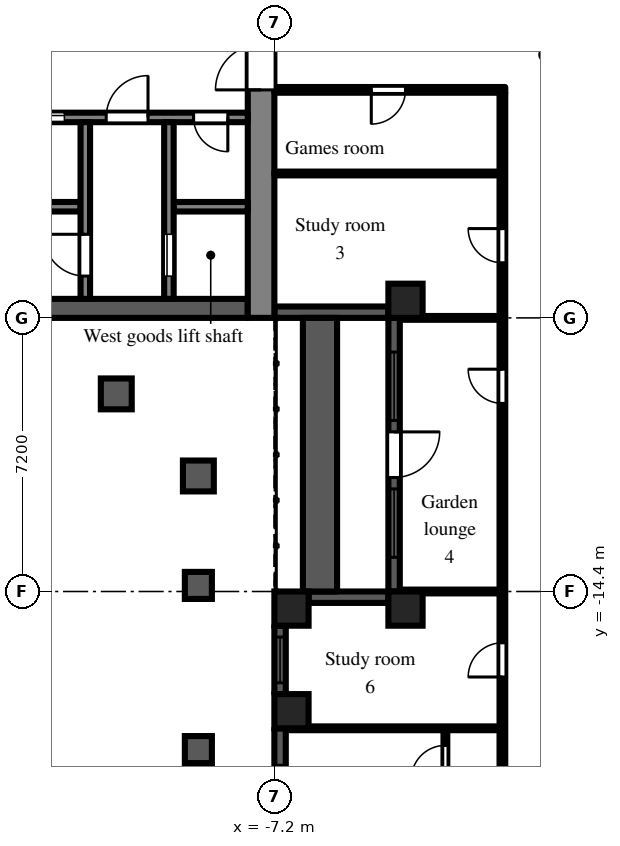
"""IFC4 building model, lengths in metres.
Left out: names, types, materials, properties, quantities, classifications, styles, units other than length and angle.
Written with IfcOpenShell. Run it as: python <this file> out.ifc"""

import sys

from ifc_helpers import new_model, si_unit, direction, frame, frame_2d, origin, origin_2d, place, context, subcontext, project, spatial, rectangle, extrude, element, fill, save


model = new_model("IFC4")
c1 = context("Model", 3, precision=1e-05, world=origin(), true_north=direction((0.0, 1.0)))
c2 = subcontext(c1, "Body", "Model", "MODEL_VIEW")
j1 = project(units=[si_unit("LENGTHUNIT", "METRE"), si_unit("PLANEANGLEUNIT", "RADIAN")], contexts=[c1])
p1 = place(None, origin())
s1 = spatial("IfcSite", under=j1, at=p1, CompositionType="ELEMENT")
p2 = place(p1, origin())
s2 = spatial("IfcBuilding", under=s1, at=p2, CompositionType="ELEMENT")
p3 = place(p2, frame((0.0, 0.0, 84.9)))
s3 = spatial("IfcBuildingStorey", under=s2, at=p3, CompositionType="ELEMENT", Elevation=84.9)
for number, where, z_axis, x_axis in (
    (1, (-6.75, -17.55, 0.0), (0.0, 0.0, 1.0), (1.0, 0.0, 0.0)),
    (2, (-6.75, -14.85, 0.0), (0.0, 0.0, 1.0), (1.0, 0.0, 0.0)),
    (3, (-3.75, -14.85, 0.0), (0.0, 0.0, 1.0), (1.0, 0.0, 0.0)),
    (4, (-3.75, -6.75, 0.0), (0.0, 0.0, 1.0), (1.0, 0.0, 0.0)),
):
    element("IfcColumn", number, at=place(p3, frame(where, z_axis=z_axis, x_axis=x_axis)), inside=s3, PredefinedType="COLUMN", context=c2, shape_type="SweptSolid", body=[
        extrude(rectangle(XDim=0.9, YDim=0.9, at=origin_2d()), origin(), (0.0, 0.0, 1.0), 3.0),
    ])
p4 = place(p3, frame((-7.2, -7.05, 0.0), z_axis=(0.0, 0.0, 1.0), x_axis=(1.0, 0.0, 0.0)))
e5 = element("IfcWall", 5, at=p4, inside=s3, PredefinedType="SOLIDWALL", context=c2, shape_type="SweptSolid", body=[
    extrude(rectangle(XDim=3.0, YDim=0.3, at=frame_2d((1.5, 0.0))), origin(), (0.0, 0.0, 1.0), 2.1),
])
p5 = place(p3, frame((-4.05, -7.2, 0.0), z_axis=(0.0, 0.0, 1.0), x_axis=(0.0, -1.0, 0.0)))
e6 = element("IfcWall", 6, at=p5, inside=s3, PredefinedType="SOLIDWALL", context=c2, shape_type="SweptSolid", body=[
    extrude(rectangle(XDim=7.2, YDim=0.3, at=frame_2d((3.6, 0.0))), origin(), (0.0, 0.0, 1.0), 2.1),
])
p6 = place(p5, frame((3.0, 0.0, 0.0)))
e7 = element("IfcOpeningElement", 7, at=p6, cuts=e6, PredefinedType="OPENING", context=c2, shape_type="SweptSolid", body=[
    extrude(rectangle(XDim=1.2, YDim=2.05, at=frame_2d((0.6, 1.025))), frame((0.0, 0.16, 0.0), z_axis=(0.0, -1.0, 0.0), x_axis=(1.0, 0.0, 0.0)), (0.0, 0.0, 1.0), 0.32),
])
p7 = place(p5, frame((0.9, 0.0, 0.2)))
e8 = element("IfcOpeningElement", 8, at=p7, cuts=e6, PredefinedType="OPENING", context=c2, shape_type="SweptSolid", body=[
    extrude(rectangle(XDim=1.8, YDim=1.85, at=frame_2d((0.9, 0.925))), frame((0.0, 0.16, 0.0), z_axis=(0.0, -1.0, 0.0), x_axis=(1.0, 0.0, 0.0)), (0.0, 0.0, 1.0), 0.32),
])
p8 = place(p5, frame((4.5, 0.0, 0.2)))
e9 = element("IfcOpeningElement", 9, at=p8, cuts=e6, PredefinedType="OPENING", context=c2, shape_type="SweptSolid", body=[
    extrude(rectangle(XDim=1.8, YDim=1.85, at=frame_2d((0.9, 0.925))), frame((0.0, 0.16, 0.0), z_axis=(0.0, -1.0, 0.0), x_axis=(1.0, 0.0, 0.0)), (0.0, 0.0, 1.0), 0.32),
])
p9 = place(p3, frame((-4.2, -14.55, 0.0), z_axis=(0.0, 0.0, 1.0), x_axis=(-1.0, 0.0, 0.0)))
e10 = element("IfcWall", 10, at=p9, inside=s3, PredefinedType="SOLIDWALL", context=c2, shape_type="SweptSolid", body=[
    extrude(rectangle(XDim=2.1, YDim=0.3, at=frame_2d((1.05, 0.0))), origin(), (0.0, 0.0, 1.0), 2.1),
])
p10 = place(p3, frame((-7.05, -15.3, 0.0), z_axis=(0.0, 0.0, 1.0), x_axis=(0.0, -1.0, 0.0)))
e11 = element("IfcWall", 11, at=p10, inside=s3, PredefinedType="SOLIDWALL", context=c2, shape_type="SweptSolid", body=[
    extrude(rectangle(XDim=1.8, YDim=0.3, at=frame_2d((0.9, 0.0))), origin(), (0.0, 0.0, 1.0), 2.1),
])
p11 = place(p10, frame((0.3, 0.0, 0.2)))
e12 = element("IfcOpeningElement", 12, at=p11, cuts=e11, PredefinedType="OPENING", context=c2, shape_type="SweptSolid", body=[
    extrude(rectangle(XDim=1.2, YDim=1.85, at=frame_2d((0.6, 0.925))), frame((0.0, 0.16, 0.0), z_axis=(0.0, -1.0, 0.0), x_axis=(1.0, 0.0, 0.0)), (0.0, 0.0, 1.0), 0.32),
])
p12 = place(p3, frame((-7.05, -18.0, 0.0), z_axis=(0.0, 0.0, 1.0), x_axis=(0.0, -1.0, 0.0)))
e13 = element("IfcWall", 13, at=p12, inside=s3, PredefinedType="SOLIDWALL", context=c2, shape_type="SweptSolid", body=[
    extrude(rectangle(XDim=3.15, YDim=0.3, at=frame_2d((1.575, 0.0))), origin(), (0.0, 0.0, 1.0), 2.1),
])
p13 = place(p12, frame((0.975, 0.0, 0.2)))
e14 = element("IfcOpeningElement", 14, at=p13, cuts=e13, PredefinedType="OPENING", context=c2, shape_type="SweptSolid", body=[
    extrude(rectangle(XDim=1.2, YDim=1.85, at=frame_2d((0.6, 0.925))), frame((0.0, 0.16, 0.0), z_axis=(0.0, -1.0, 0.0), x_axis=(1.0, 0.0, 0.0)), (0.0, 0.0, 1.0), 0.32),
])
p14 = place(p3, frame((-6.0, -14.4, 0.0), z_axis=(0.0, 0.0, 1.0), x_axis=(0.0, 1.0, 0.0)))
e15 = element("IfcWall", 15, at=p14, inside=s3, PredefinedType="PARAPET", context=c2, shape_type="SweptSolid", body=[
    extrude(rectangle(XDim=7.2, YDim=0.9, at=frame_2d((3.6, 0.0))), origin(), (0.0, 0.0, 1.0), 0.8),
])
p15 = place(p3, frame((-7.55, -7.2, 0.0), z_axis=(0.0, 0.0, 1.0), x_axis=(0.0, 1.0, 0.0)))
e16 = element("IfcWall", 16, at=p15, inside=s3, PredefinedType="SHEAR", context=c2, shape_type="SweptSolid", body=[
    extrude(rectangle(XDim=14.4, YDim=0.7, at=frame_2d((7.2, 0.0))), origin(), (0.0, 0.0, 1.0), 2.575),
])
p16 = place(p15, frame((6.0, 0.0, 0.0)))
e17 = element("IfcOpeningElement", 17, at=p16, cuts=e16, PredefinedType="OPENING", context=c2, shape_type="SweptSolid", body=[
    extrude(rectangle(XDim=2.4, YDim=2.2, at=frame_2d((1.2, 1.1))), frame((0.0, 0.36, 0.0), z_axis=(0.0, -1.0, 0.0), x_axis=(1.0, 0.0, 0.0)), (0.0, 0.0, 1.0), 0.72),
])
p17 = place(p3, frame((-7.9, -6.95, 0.0), z_axis=(0.0, 0.0, 1.0), x_axis=(-1.0, 0.0, 0.0)))
e18 = element("IfcWall", 18, at=p17, inside=s3, PredefinedType="SHEAR", context=c2, shape_type="SweptSolid", body=[
    extrude(rectangle(XDim=12.95, YDim=0.5, at=frame_2d((6.475, 0.0))), origin(), (0.0, 0.0, 1.0), 2.575),
])
p18 = place(p3, frame((-7.9, -1.925, 0.0), z_axis=(0.0, 0.0, 1.0), x_axis=(-1.0, 0.0, 0.0)))
e19 = element("IfcWall", 19, at=p18, inside=s3, PredefinedType="SHEAR", context=c2, shape_type="SweptSolid", body=[
    extrude(rectangle(XDim=12.95, YDim=0.25, at=frame_2d((6.475, 0.0))), origin(), (0.0, 0.0, 1.0), 2.575),
])
p19 = place(p18, frame((4.825, 0.0, 0.0)))
e20 = element("IfcOpeningElement", 20, at=p19, cuts=e19, PredefinedType="OPENING", context=c2, shape_type="SweptSolid", body=[
    extrude(rectangle(XDim=1.1, YDim=2.1, at=frame_2d((0.55, 1.05))), frame((0.0, 0.135, 0.0), z_axis=(0.0, -1.0, 0.0), x_axis=(1.0, 0.0, 0.0)), (0.0, 0.0, 1.0), 0.27),
])
p20 = place(p18, frame((7.025, 0.0, 0.0)))
e21 = element("IfcOpeningElement", 21, at=p20, cuts=e19, PredefinedType="OPENING", context=c2, shape_type="SweptSolid", body=[
    extrude(rectangle(XDim=1.1, YDim=2.1, at=frame_2d((0.55, 1.05))), frame((0.0, 0.135, 0.0), z_axis=(0.0, -1.0, 0.0), x_axis=(1.0, 0.0, 0.0)), (0.0, 0.0, 1.0), 0.27),
])
p21 = place(p18, frame((9.225, 0.0, 0.0)))
e22 = element("IfcOpeningElement", 22, at=p21, cuts=e19, PredefinedType="OPENING", context=c2, shape_type="SweptSolid", body=[
    extrude(rectangle(XDim=1.1, YDim=2.1, at=frame_2d((0.55, 1.05))), frame((0.0, 0.135, 0.0), z_axis=(0.0, -1.0, 0.0), x_axis=(1.0, 0.0, 0.0)), (0.0, 0.0, 1.0), 0.27),
])
p22 = place(p18, frame((0.525, 0.0, 0.0)))
e23 = element("IfcOpeningElement", 23, at=p22, cuts=e19, PredefinedType="OPENING", context=c2, shape_type="SweptSolid", body=[
    extrude(rectangle(XDim=0.9, YDim=2.1, at=frame_2d((0.45, 1.05))), frame((0.0, 0.135, 0.0), z_axis=(0.0, -1.0, 0.0), x_axis=(1.0, 0.0, 0.0)), (0.0, 0.0, 1.0), 0.27),
])
p23 = place(p18, frame((2.625, 0.0, 0.0)))
e24 = element("IfcOpeningElement", 24, at=p23, cuts=e19, PredefinedType="OPENING", context=c2, shape_type="SweptSolid", body=[
    extrude(rectangle(XDim=1.1, YDim=2.1, at=frame_2d((0.55, 1.05))), frame((0.0, 0.135, 0.0), z_axis=(0.0, -1.0, 0.0), x_axis=(1.0, 0.0, 0.0)), (0.0, 0.0, 1.0), 0.27),
])
p24 = place(p3, frame((-7.9, -4.275, 0.0), z_axis=(0.0, 0.0, 1.0), x_axis=(-1.0, 0.0, 0.0)))
e25 = element("IfcWall", 25, at=p24, inside=s3, PredefinedType="SHEAR", context=c2, shape_type="SweptSolid", body=[
    extrude(rectangle(XDim=1.95, YDim=0.25, at=frame_2d((0.975, 0.0))), origin(), (0.0, 0.0, 1.0), 2.575),
])
p25 = place(p3, frame((-12.3, -4.275, 0.0), z_axis=(0.0, 0.0, 1.0), x_axis=(-1.0, 0.0, 0.0)))
e26 = element("IfcWall", 26, at=p25, inside=s3, PredefinedType="SHEAR", context=c2, shape_type="SweptSolid", body=[
    extrude(rectangle(XDim=8.55, YDim=0.25, at=frame_2d((4.275, 0.0))), origin(), (0.0, 0.0, 1.0), 2.575),
])
p26 = place(p3, frame((-9.975, -2.05, 0.0), z_axis=(0.0, 0.0, 1.0), x_axis=(0.0, -1.0, 0.0)))
e27 = element("IfcWall", 27, at=p26, inside=s3, PredefinedType="SHEAR", context=c2, shape_type="SweptSolid", body=[
    extrude(rectangle(XDim=4.65, YDim=0.25, at=frame_2d((2.325, 0.0))), origin(), (0.0, 0.0, 1.0), 2.575),
])
p27 = place(p26, frame((2.95, 0.0, 0.0)))
e28 = element("IfcOpeningElement", 28, at=p27, cuts=e27, PredefinedType="OPENING", context=c2, shape_type="SweptSolid", body=[
    extrude(rectangle(XDim=1.1, YDim=2.1, at=frame_2d((0.55, 1.05))), frame((0.0, 0.135, 0.0), z_axis=(0.0, -1.0, 0.0), x_axis=(1.0, 0.0, 0.0)), (0.0, 0.0, 1.0), 0.27),
])
p28 = place(p3, frame((-12.175, -2.05, 0.0), z_axis=(0.0, 0.0, 1.0), x_axis=(0.0, -1.0, 0.0)))
e29 = element("IfcWall", 29, at=p28, inside=s3, PredefinedType="SHEAR", context=c2, shape_type="SweptSolid", body=[
    extrude(rectangle(XDim=4.65, YDim=0.25, at=frame_2d((2.325, 0.0))), origin(), (0.0, 0.0, 1.0), 2.575),
])
p29 = place(p28, frame((2.95, 0.0, 0.0)))
e30 = element("IfcOpeningElement", 30, at=p29, cuts=e29, PredefinedType="OPENING", context=c2, shape_type="SweptSolid", body=[
    extrude(rectangle(XDim=1.1, YDim=2.1, at=frame_2d((0.55, 1.05))), frame((0.0, 0.135, 0.0), z_axis=(0.0, -1.0, 0.0), x_axis=(1.0, 0.0, 0.0)), (0.0, 0.0, 1.0), 0.27),
])
p30 = place(p3, frame((-7.2, -3.4, 0.0), z_axis=(0.0, 0.0, 1.0), x_axis=(1.0, 0.0, 0.0)))
e31 = element("IfcWall", 31, at=p30, inside=s3, PredefinedType="PARTITIONING", context=c2, shape_type="SweptSolid", body=[
    extrude(rectangle(XDim=5.925, YDim=0.1, at=frame_2d((2.962, 0.0))), origin(), (0.0, 0.0, 1.0), 2.575),
])
p31 = place(p3, frame((-7.2, -1.2, 0.0), z_axis=(0.0, 0.0, 1.0), x_axis=(1.0, 0.0, 0.0)))
e32 = element("IfcWall", 32, at=p31, inside=s3, PredefinedType="PARTITIONING", context=c2, shape_type="SweptSolid", body=[
    extrude(rectangle(XDim=6.075, YDim=0.15, at=frame_2d((3.038, 0.0))), origin(), (0.0, 0.0, 1.0), 2.575),
])
p32 = place(p31, frame((2.55, 0.0, 0.0)))
e33 = element("IfcOpeningElement", 33, at=p32, cuts=e32, PredefinedType="OPENING", context=c2, shape_type="SweptSolid", body=[
    extrude(rectangle(XDim=0.9, YDim=2.1, at=frame_2d((0.45, 1.05))), frame((0.0, 0.085, 0.0), z_axis=(0.0, -1.0, 0.0), x_axis=(1.0, 0.0, 0.0)), (0.0, 0.0, 1.0), 0.17),
])
p33 = place(p3, frame((-6.9, -18.0, 0.0), z_axis=(0.0, 0.0, 1.0), x_axis=(1.0, 0.0, 0.0)))
e34 = element("IfcWall", 34, at=p33, inside=s3, PredefinedType="PARTITIONING", context=c2, shape_type="SweptSolid", body=[
    extrude(rectangle(XDim=5.625, YDim=0.1, at=frame_2d((2.812, 0.0))), origin(), (0.0, 0.0, 1.0), 2.575),
])
for number, where, z_axis, x_axis in (
    (35, (-3.9, -14.4, 0.0), (0.0, 0.0, 1.0), (1.0, 0.0, 0.0)),
    (36, (-3.9, -7.2, 0.0), (0.0, 0.0, 1.0), (1.0, 0.0, 0.0)),
):
    element("IfcWall", number, at=place(p3, frame(where, z_axis=z_axis, x_axis=x_axis)), inside=s3, PredefinedType="PARTITIONING", context=c2, shape_type="SweptSolid", body=[
        extrude(rectangle(XDim=2.625, YDim=0.1, at=frame_2d((1.312, 0.0))), origin(), (0.0, 0.0, 1.0), 2.575),
    ])
p34 = place(p3, frame((-2.7, -32.35, 0.0), z_axis=(0.0, 0.0, 1.0), x_axis=(0.0, 1.0, 0.0)))
e37 = element("IfcWall", 37, at=p34, inside=s3, PredefinedType="PARTITIONING", context=c2, shape_type="SweptSolid", body=[
    extrude(rectangle(XDim=14.3, YDim=0.1, at=frame_2d((7.15, 0.0))), origin(), (0.0, 0.0, 1.0), 2.575),
])
p35 = place(p34, frame((0.4, 0.0, 0.0)))
e38 = element("IfcOpeningElement", 38, at=p35, cuts=e37, PredefinedType="OPENING", context=c2, shape_type="SweptSolid", body=[
    extrude(rectangle(XDim=0.9, YDim=2.1, at=frame_2d((0.45, 1.05))), frame((0.0, 0.06, 0.0), z_axis=(0.0, -1.0, 0.0), x_axis=(1.0, 0.0, 0.0)), (0.0, 0.0, 1.0), 0.12),
])
p36 = place(p34, frame((5.8, 0.0, 0.0)))
e39 = element("IfcOpeningElement", 39, at=p36, cuts=e37, PredefinedType="OPENING", context=c2, shape_type="SweptSolid", body=[
    extrude(rectangle(XDim=0.9, YDim=2.1, at=frame_2d((0.45, 1.05))), frame((0.0, 0.06, 0.0), z_axis=(0.0, -1.0, 0.0), x_axis=(1.0, 0.0, 0.0)), (0.0, 0.0, 1.0), 0.12),
])
p37 = place(p34, frame((7.6, 0.0, 0.0)))
e40 = element("IfcOpeningElement", 40, at=p37, cuts=e37, PredefinedType="OPENING", context=c2, shape_type="SweptSolid", body=[
    extrude(rectangle(XDim=0.9, YDim=2.1, at=frame_2d((0.45, 1.05))), frame((0.0, 0.06, 0.0), z_axis=(0.0, -1.0, 0.0), x_axis=(1.0, 0.0, 0.0)), (0.0, 0.0, 1.0), 0.12),
])
p38 = place(p34, frame((13.0, 0.0, 0.0)))
e41 = element("IfcOpeningElement", 41, at=p38, cuts=e37, PredefinedType="OPENING", context=c2, shape_type="SweptSolid", body=[
    extrude(rectangle(XDim=0.9, YDim=2.1, at=frame_2d((0.45, 1.05))), frame((0.0, 0.06, 0.0), z_axis=(0.0, -1.0, 0.0), x_axis=(1.0, 0.0, 0.0)), (0.0, 0.0, 1.0), 0.12),
])
p39 = place(p3, frame((-1.2, -36.5, 0.0), z_axis=(0.0, 0.0, 1.0), x_axis=(0.0, 1.0, 0.0)))
e42 = element("IfcWall", 42, at=p39, inside=s3, PredefinedType="PARTITIONING", context=c2, shape_type="SweptSolid", body=[
    extrude(rectangle(XDim=35.225, YDim=0.15, at=frame_2d((17.613, 0.0))), origin(), (0.0, 0.0, 1.0), 2.575),
])
p40 = place(p39, frame((30.75, 0.0, 0.0)))
e43 = element("IfcOpeningElement", 43, at=p40, cuts=e42, PredefinedType="OPENING", context=c2, shape_type="SweptSolid", body=[
    extrude(rectangle(XDim=0.9, YDim=2.1, at=frame_2d((0.45, 1.05))), frame((0.0, 0.085, 0.0), z_axis=(0.0, -1.0, 0.0), x_axis=(1.0, 0.0, 0.0)), (0.0, 0.0, 1.0), 0.17),
])
p41 = place(p39, frame((27.05, 0.0, 0.0)))
e44 = element("IfcOpeningElement", 44, at=p41, cuts=e42, PredefinedType="OPENING", context=c2, shape_type="SweptSolid", body=[
    extrude(rectangle(XDim=0.9, YDim=2.1, at=frame_2d((0.45, 1.05))), frame((0.0, 0.085, 0.0), z_axis=(0.0, -1.0, 0.0), x_axis=(1.0, 0.0, 0.0)), (0.0, 0.0, 1.0), 0.17),
])
p42 = place(p39, frame((19.85, 0.0, 0.0)))
e45 = element("IfcOpeningElement", 45, at=p42, cuts=e42, PredefinedType="OPENING", context=c2, shape_type="SweptSolid", body=[
    extrude(rectangle(XDim=0.9, YDim=2.1, at=frame_2d((0.45, 1.05))), frame((0.0, 0.085, 0.0), z_axis=(0.0, -1.0, 0.0), x_axis=(1.0, 0.0, 0.0)), (0.0, 0.0, 1.0), 0.17),
])
p43 = place(p39, frame((1.55, 0.0, 0.0)))
e46 = element("IfcOpeningElement", 46, at=p43, cuts=e42, PredefinedType="OPENING", context=c2, shape_type="SweptSolid", body=[
    extrude(rectangle(XDim=1.0, YDim=2.1, at=frame_2d((0.5, 1.05))), frame((0.0, 0.085, 0.0), z_axis=(0.0, -1.0, 0.0), x_axis=(1.0, 0.0, 0.0)), (0.0, 0.0, 1.0), 0.17),
])
p44 = place(p6, origin())
e47 = element("IfcDoor", 47, at=p44, inside=s3, OperationType="SINGLE_SWING_LEFT", PredefinedType="DOOR", context=c2, shape_type="SweptSolid", body=[
    extrude(rectangle(XDim=1.2, YDim=2.05, at=frame_2d((0.6, 1.025))), frame((0.0, 0.025, 0.0), z_axis=(0.0, -1.0, 0.0), x_axis=(1.0, 0.0, 0.0)), (0.0, 0.0, 1.0), 0.05),
])
fill(e7, e47)
p45 = place(p7, origin())
e48 = element("IfcWindow", 48, at=p45, inside=s3, PartitioningType="SINGLE_PANEL", PredefinedType="WINDOW", context=c2, shape_type="SweptSolid", body=[
    extrude(rectangle(XDim=1.8, YDim=1.85, at=frame_2d((0.9, 0.925))), frame((0.0, 0.03, 0.0), z_axis=(0.0, -1.0, 0.0), x_axis=(1.0, 0.0, 0.0)), (0.0, 0.0, 1.0), 0.06),
])
fill(e8, e48)
p46 = place(p8, origin())
e49 = element("IfcWindow", 49, at=p46, inside=s3, PartitioningType="SINGLE_PANEL", PredefinedType="WINDOW", context=c2, shape_type="SweptSolid", body=[
    extrude(rectangle(XDim=1.8, YDim=1.85, at=frame_2d((0.9, 0.925))), frame((0.0, 0.03, 0.0), z_axis=(0.0, -1.0, 0.0), x_axis=(1.0, 0.0, 0.0)), (0.0, 0.0, 1.0), 0.06),
])
fill(e9, e49)
p47 = place(p11, origin())
e50 = element("IfcWindow", 50, at=p47, inside=s3, PartitioningType="SINGLE_PANEL", PredefinedType="WINDOW", context=c2, shape_type="SweptSolid", body=[
    extrude(rectangle(XDim=1.2, YDim=1.85, at=frame_2d((0.6, 0.925))), frame((0.0, 0.03, 0.0), z_axis=(0.0, -1.0, 0.0), x_axis=(1.0, 0.0, 0.0)), (0.0, 0.0, 1.0), 0.06),
])
fill(e12, e50)
p48 = place(p13, origin())
e51 = element("IfcWindow", 51, at=p48, inside=s3, PartitioningType="SINGLE_PANEL", PredefinedType="WINDOW", context=c2, shape_type="SweptSolid", body=[
    extrude(rectangle(XDim=1.2, YDim=1.85, at=frame_2d((0.6, 0.925))), frame((0.0, 0.03, 0.0), z_axis=(0.0, -1.0, 0.0), x_axis=(1.0, 0.0, 0.0)), (0.0, 0.0, 1.0), 0.06),
])
fill(e14, e51)
p49 = place(p19, origin())
e52 = element("IfcDoor", 52, at=p49, inside=s3, OperationType="SLIDING_TO_LEFT", PredefinedType="DOOR", context=c2, shape_type="SweptSolid", body=[
    extrude(rectangle(XDim=1.1, YDim=2.1, at=frame_2d((0.55, 1.05))), frame((0.0, 0.025, 0.0), z_axis=(0.0, -1.0, 0.0), x_axis=(1.0, 0.0, 0.0)), (0.0, 0.0, 1.0), 0.05),
])
fill(e20, e52)
p50 = place(p27, origin())
e53 = element("IfcDoor", 53, at=p50, inside=s3, OperationType="SLIDING_TO_LEFT", PredefinedType="DOOR", context=c2, shape_type="SweptSolid", body=[
    extrude(rectangle(XDim=1.1, YDim=2.1, at=frame_2d((0.55, 1.05))), frame((0.0, 0.025, 0.0), z_axis=(0.0, -1.0, 0.0), x_axis=(1.0, 0.0, 0.0)), (0.0, 0.0, 1.0), 0.05),
])
fill(e28, e53)
p51 = place(p29, frame((1.1, 0.0, 0.0), z_axis=(0.0, 0.0, 1.0), x_axis=(-1.0, 0.0, 0.0)))
e54 = element("IfcDoor", 54, at=p51, inside=s3, OperationType="SINGLE_SWING_RIGHT", PredefinedType="DOOR", context=c2, shape_type="SweptSolid", body=[
    extrude(rectangle(XDim=1.1, YDim=2.1, at=frame_2d((0.55, 1.05))), frame((0.0, 0.025, 0.0), z_axis=(0.0, -1.0, 0.0), x_axis=(1.0, 0.0, 0.0)), (0.0, 0.0, 1.0), 0.05),
])
fill(e30, e54)
p52 = place(p22, origin())
e55 = element("IfcDoor", 55, at=p52, inside=s3, OperationType="SINGLE_SWING_LEFT", PredefinedType="DOOR", context=c2, shape_type="SweptSolid", body=[
    extrude(rectangle(XDim=0.9, YDim=2.1, at=frame_2d((0.45, 1.05))), frame((0.0, 0.025, 0.0), z_axis=(0.0, -1.0, 0.0), x_axis=(1.0, 0.0, 0.0)), (0.0, 0.0, 1.0), 0.05),
])
fill(e23, e55)
p53 = place(p23, frame((1.1, 0.0, 0.0), z_axis=(0.0, 0.0, 1.0), x_axis=(-1.0, 0.0, 0.0)))
e56 = element("IfcDoor", 56, at=p53, inside=s3, OperationType="SINGLE_SWING_RIGHT", PredefinedType="DOOR", context=c2, shape_type="SweptSolid", body=[
    extrude(rectangle(XDim=1.1, YDim=2.1, at=frame_2d((0.55, 1.05))), frame((0.0, 0.025, 0.0), z_axis=(0.0, -1.0, 0.0), x_axis=(1.0, 0.0, 0.0)), (0.0, 0.0, 1.0), 0.05),
])
fill(e24, e56)
p54 = place(p16, origin())
e57 = element("IfcDoor", 57, at=p54, inside=s3, OperationType="DOUBLE_DOOR_DOUBLE_SWING", PredefinedType="DOOR", context=c2, shape_type="SweptSolid", body=[
    extrude(rectangle(XDim=2.4, YDim=2.2, at=frame_2d((1.2, 1.1))), frame((0.0, 0.025, 0.0), z_axis=(0.0, -1.0, 0.0), x_axis=(1.0, 0.0, 0.0)), (0.0, 0.0, 1.0), 0.05),
])
fill(e17, e57)
p55 = place(p32, frame((0.9, 0.0, 0.0), z_axis=(0.0, 0.0, 1.0), x_axis=(-1.0, 0.0, 0.0)))
e58 = element("IfcDoor", 58, at=p55, inside=s3, OperationType="SINGLE_SWING_RIGHT", PredefinedType="DOOR", context=c2, shape_type="SweptSolid", body=[
    extrude(rectangle(XDim=0.9, YDim=2.1, at=frame_2d((0.45, 1.05))), frame((0.0, 0.025, 0.0), z_axis=(0.0, -1.0, 0.0), x_axis=(1.0, 0.0, 0.0)), (0.0, 0.0, 1.0), 0.05),
])
fill(e33, e58)
p56 = place(p40, origin())
e59 = element("IfcDoor", 59, at=p56, inside=s3, OperationType="SINGLE_SWING_RIGHT", PredefinedType="DOOR", context=c2, shape_type="SweptSolid", body=[
    extrude(rectangle(XDim=0.9, YDim=2.1, at=frame_2d((0.45, 1.05))), frame((0.0, 0.025, 0.0), z_axis=(0.0, -1.0, 0.0), x_axis=(1.0, 0.0, 0.0)), (0.0, 0.0, 1.0), 0.05),
])
fill(e43, e59)
p57 = place(p41, origin())
e60 = element("IfcDoor", 60, at=p57, inside=s3, OperationType="SINGLE_SWING_RIGHT", PredefinedType="DOOR", context=c2, shape_type="SweptSolid", body=[
    extrude(rectangle(XDim=0.9, YDim=2.1, at=frame_2d((0.45, 1.05))), frame((0.0, 0.025, 0.0), z_axis=(0.0, -1.0, 0.0), x_axis=(1.0, 0.0, 0.0)), (0.0, 0.0, 1.0), 0.05),
])
fill(e44, e60)
p58 = place(p42, origin())
e61 = element("IfcDoor", 61, at=p58, inside=s3, OperationType="SINGLE_SWING_LEFT", PredefinedType="DOOR", context=c2, shape_type="SweptSolid", body=[
    extrude(rectangle(XDim=0.9, YDim=2.1, at=frame_2d((0.45, 1.05))), frame((0.0, 0.025, 0.0), z_axis=(0.0, -1.0, 0.0), x_axis=(1.0, 0.0, 0.0)), (0.0, 0.0, 1.0), 0.05),
])
fill(e45, e61)
p59 = place(p38, origin())
e62 = element("IfcDoor", 62, at=p59, inside=s3, OperationType="SINGLE_SWING_LEFT", PredefinedType="DOOR", context=c2, shape_type="SweptSolid", body=[
    extrude(rectangle(XDim=0.9, YDim=2.1, at=frame_2d((0.45, 1.05))), frame((0.0, 0.025, 0.0), z_axis=(0.0, -1.0, 0.0), x_axis=(1.0, 0.0, 0.0)), (0.0, 0.0, 1.0), 0.05),
])
fill(e41, e62)
save(model, sys.argv[1])
